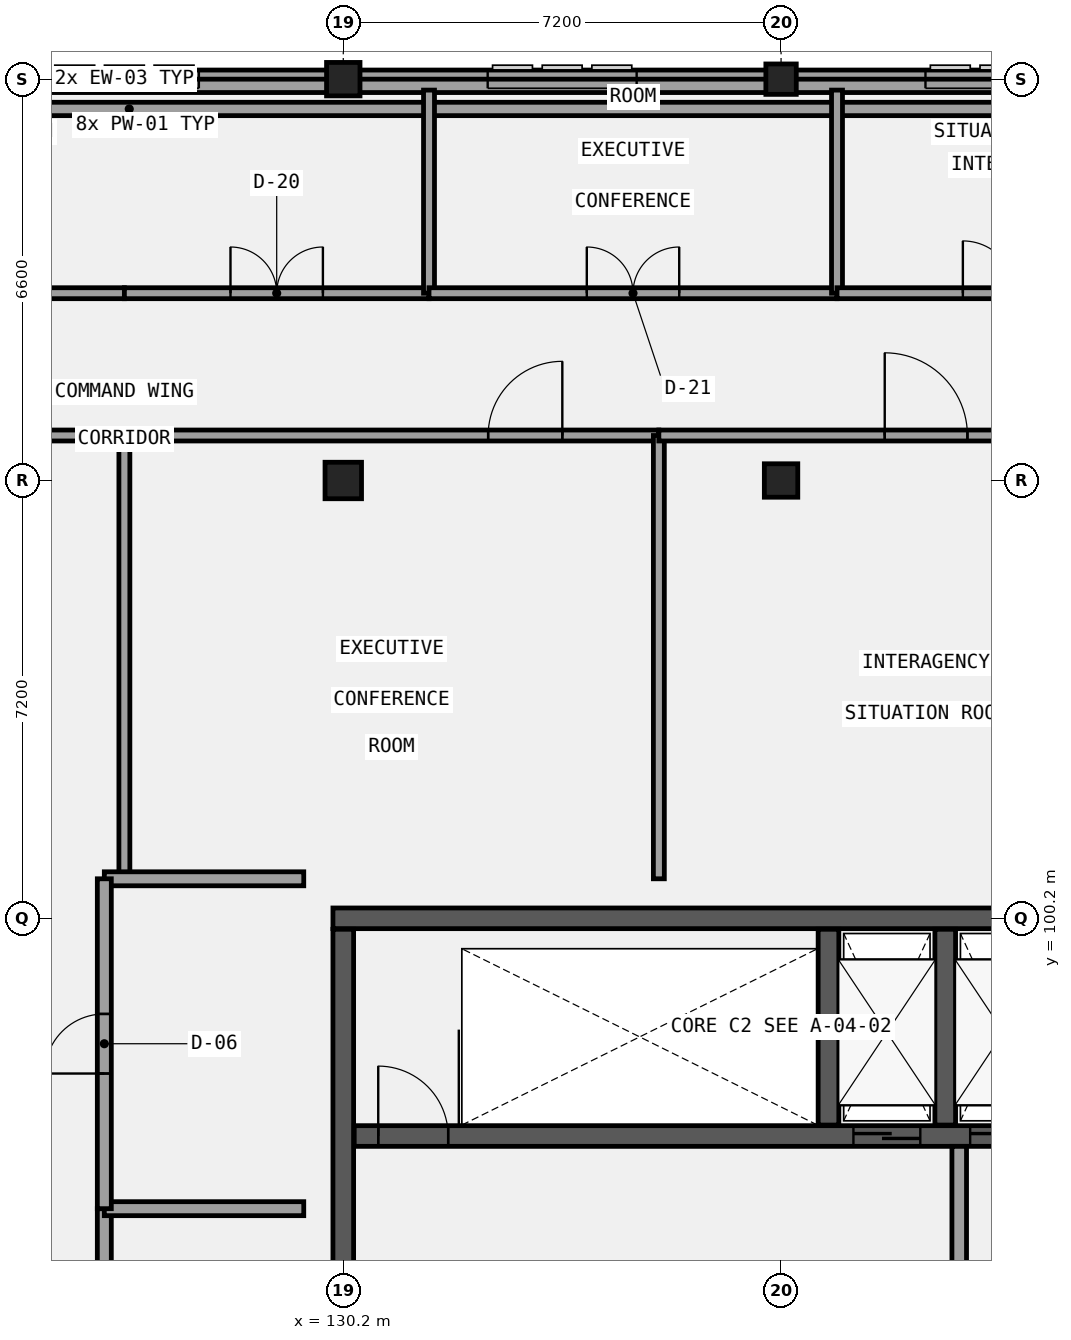
"""IFC4 building model, lengths in metres.
Left out: names, types, materials, properties, quantities, classifications, styles, units other than length and angle.
Written with IfcOpenShell. Run it as: python <this file> out.ifc"""

import sys

from ifc_helpers import new_model, si_unit, direction, frame, frame_2d, origin, origin_2d, place, context, subcontext, project, spatial, rectangle, extrude, element, fill, save


model = new_model("IFC4")
c1 = context("Model", 3, precision=1e-05, world=origin(), true_north=direction((0.0, 1.0)))
c2 = subcontext(c1, "Body", "Model", "MODEL_VIEW")
j1 = project(units=[si_unit("LENGTHUNIT", "METRE"), si_unit("PLANEANGLEUNIT", "RADIAN")], contexts=[c1])
p1 = place(None, origin())
s1 = spatial("IfcSite", under=j1, at=p1, CompositionType="ELEMENT")
p2 = place(p1, origin())
s2 = spatial("IfcBuilding", under=s1, at=p2, CompositionType="ELEMENT")
p3 = place(p2, frame((0.0, 0.0, 30.9)))
s3 = spatial("IfcBuildingStorey", under=s2, at=p3, CompositionType="ELEMENT", Elevation=30.9)
p4 = place(p3, frame((130.03, 100.2, 0.0), z_axis=(0.0, 0.0, 1.0), x_axis=(1.0, 0.0, 0.0)))
e1 = element("IfcWall", 1, at=p4, inside=s3, PredefinedType="SHEAR", context=c2, shape_type="SweptSolid", body=[
    extrude(rectangle(XDim=14.74, YDim=0.34, at=frame_2d((7.37, 0.0))), origin(), (0.0, 0.0, 1.0), 4.5),
])
p5 = place(p3, frame((130.2, 93.18, 0.0), z_axis=(0.0, 0.0, 1.0), x_axis=(0.0, 1.0, 0.0)))
e2 = element("IfcWall", 2, at=p5, inside=s3, PredefinedType="SHEAR", context=c2, shape_type="SweptSolid", body=[
    extrude(rectangle(XDim=6.84, YDim=0.34, at=frame_2d((3.42, 0.0))), origin(), (0.0, 0.0, 1.0), 4.5),
])
p6 = place(p3, frame((130.38, 96.62, 0.0), z_axis=(0.0, 0.0, 1.0), x_axis=(1.0, 0.0, 0.0)))
e3 = element("IfcWall", 3, at=p6, inside=s3, PredefinedType="SHEAR", context=c2, shape_type="SweptSolid", body=[
    extrude(rectangle(XDim=14.04, YDim=0.34, at=frame_2d((7.02, 0.0))), origin(), (0.0, 0.0, 1.0), 4.5),
])
p7 = place(p6, frame((8.21, 0.0, 0.0)))
e4 = element("IfcOpeningElement", 4, at=p7, cuts=e3, PredefinedType="OPENING", context=c2, shape_type="SweptSolid", body=[
    extrude(rectangle(XDim=1.1, YDim=2.15, at=frame_2d((0.55, 1.075))), frame((0.0, 0.18, 0.0), z_axis=(0.0, -1.0, 0.0), x_axis=(1.0, 0.0, 0.0)), (0.0, 0.0, 1.0), 0.36),
])
p8 = place(p6, frame((10.13, 0.0, 0.0)))
e5 = element("IfcOpeningElement", 5, at=p8, cuts=e3, PredefinedType="OPENING", context=c2, shape_type="SweptSolid", body=[
    extrude(rectangle(XDim=1.1, YDim=2.15, at=frame_2d((0.55, 1.075))), frame((0.0, 0.18, 0.0), z_axis=(0.0, -1.0, 0.0), x_axis=(1.0, 0.0, 0.0)), (0.0, 0.0, 1.0), 0.36),
])
p9 = place(p6, frame((12.05, 0.0, 0.0)))
e6 = element("IfcOpeningElement", 6, at=p9, cuts=e3, PredefinedType="OPENING", context=c2, shape_type="SweptSolid", body=[
    extrude(rectangle(XDim=1.1, YDim=2.15, at=frame_2d((0.55, 1.075))), frame((0.0, 0.18, 0.0), z_axis=(0.0, -1.0, 0.0), x_axis=(1.0, 0.0, 0.0)), (0.0, 0.0, 1.0), 0.36),
])
p10 = place(p6, frame((0.395, 0.0, 0.0)))
e7 = element("IfcOpeningElement", 7, at=p10, cuts=e3, PredefinedType="OPENING", context=c2, shape_type="SweptSolid", body=[
    extrude(rectangle(XDim=1.15, YDim=2.15, at=frame_2d((0.575, 1.075))), frame((0.0, 0.18, 0.0), z_axis=(0.0, -1.0, 0.0), x_axis=(1.0, 0.0, 0.0)), (0.0, 0.0, 1.0), 0.36),
])
for number, where, z_axis, x_axis in (
    (8, (138.18, 96.8, 0.0), (0.0, 0.0, 1.0), (0.0, 1.0, 0.0)),
    (9, (140.1, 96.8, 0.0), (0.0, 0.0, 1.0), (0.0, 1.0, 0.0)),
):
    element("IfcWall", number, at=place(p3, frame(where, z_axis=z_axis, x_axis=x_axis)), inside=s3, PredefinedType="SHEAR", context=c2, shape_type="SweptSolid", body=[
        extrude(rectangle(XDim=3.22, YDim=0.34, at=frame_2d((1.61, 0.0))), origin(), (0.0, 0.0, 1.0), 4.5),
    ])
p11 = place(p3, frame((130.2, 107.4, 0.0), z_axis=(0.0, 0.0, 1.0), x_axis=(1.0, 0.0, 0.0)))
e10 = element("IfcColumn", 10, at=p11, inside=s3, PredefinedType="COLUMN", context=c2, shape_type="SweptSolid", body=[
    extrude(rectangle(XDim=0.6, YDim=0.6, at=origin_2d()), origin(), (0.0, 0.0, 1.0), 4.5),
])
for number, where, z_axis, x_axis in (
    (11, (130.2, 114.0, 0.0), (0.0, 0.0, 1.0), (1.0, 0.0, 0.0)),
    (12, (137.4, 107.4, 0.0), (0.0, 0.0, 1.0), (1.0, 0.0, 0.0)),
):
    element("IfcColumn", number, at=place(p3, frame(where, z_axis=z_axis, x_axis=x_axis)), inside=s3, PredefinedType="COLUMN", context=c2, shape_type="SweptSolid", body=[
        extrude(rectangle(XDim=0.55, YDim=0.55, at=origin_2d()), origin(), (0.0, 0.0, 1.0), 4.5),
    ])
p12 = place(p3, frame((137.4, 114.0, 0.0), z_axis=(0.0, 0.0, 1.0), x_axis=(1.0, 0.0, 0.0)))
e13 = element("IfcColumn", 13, at=p12, inside=s3, PredefinedType="COLUMN", context=c2, shape_type="SweptSolid", body=[
    extrude(rectangle(XDim=0.5, YDim=0.5, at=origin_2d()), origin(), (0.0, 0.0, 1.0), 4.5),
])
p13 = place(p3, frame((140.33, 93.17, 0.0), z_axis=(0.0, 0.0, 1.0), x_axis=(0.0, 1.0, 0.0)))
e14 = element("IfcWall", 14, at=p13, inside=s3, PredefinedType="SOLIDWALL", context=c2, shape_type="SweptSolid", body=[
    extrude(rectangle(XDim=3.28, YDim=0.24, at=frame_2d((1.64, 0.0))), origin(), (0.0, 0.0, 1.0), 4.22),
])
p14 = place(p3, frame((144.75, 114.0, 0.0), z_axis=(0.0, 0.0, 1.0), x_axis=(-1.0, 0.0, 0.0)))
e15 = element("IfcWall", 15, at=p14, inside=s3, PredefinedType="SOLIDWALL", context=c2, shape_type="SweptSolid", body=[
    extrude(rectangle(XDim=36.3, YDim=0.3, at=frame_2d((18.15, 0.0))), origin(), (0.0, 0.0, 1.0), 3.5),
])
p15 = place(p14, frame((31.45, 0.0, 0.95)))
e16 = element("IfcOpeningElement", 16, at=p15, cuts=e15, PredefinedType="OPENING", context=c2, shape_type="SweptSolid", body=[
    extrude(rectangle(XDim=2.2, YDim=2.15, at=frame_2d((1.1, 1.075))), frame((0.0, 0.16, 0.0), z_axis=(0.0, -1.0, 0.0), x_axis=(1.0, 0.0, 0.0)), (0.0, 0.0, 1.0), 0.32),
])
p16 = place(p14, frame((24.125, 0.0, 0.95)))
e17 = element("IfcOpeningElement", 17, at=p16, cuts=e15, PredefinedType="OPENING", context=c2, shape_type="SweptSolid", body=[
    extrude(rectangle(XDim=2.45, YDim=1.4, at=frame_2d((1.225, 0.7))), frame((0.0, 0.16, 0.0), z_axis=(0.0, -1.0, 0.0), x_axis=(1.0, 0.0, 0.0)), (0.0, 0.0, 1.0), 0.32),
])
p17 = place(p14, frame((16.925, 0.0, 0.95)))
e18 = element("IfcOpeningElement", 18, at=p17, cuts=e15, PredefinedType="OPENING", context=c2, shape_type="SweptSolid", body=[
    extrude(rectangle(XDim=2.45, YDim=1.65, at=frame_2d((1.225, 0.825))), frame((0.0, 0.16, 0.0), z_axis=(0.0, -1.0, 0.0), x_axis=(1.0, 0.0, 0.0)), (0.0, 0.0, 1.0), 0.32),
])
p18 = place(p14, frame((9.725, 0.0, 0.95)))
e19 = element("IfcOpeningElement", 19, at=p18, cuts=e15, PredefinedType="OPENING", context=c2, shape_type="SweptSolid", body=[
    extrude(rectangle(XDim=2.45, YDim=1.9, at=frame_2d((1.225, 0.95))), frame((0.0, 0.16, 0.0), z_axis=(0.0, -1.0, 0.0), x_axis=(1.0, 0.0, 0.0)), (0.0, 0.0, 1.0), 0.32),
])
p19 = place(p14, frame((2.525, 0.0, 0.95)))
e20 = element("IfcOpeningElement", 20, at=p19, cuts=e15, PredefinedType="OPENING", context=c2, shape_type="SweptSolid", body=[
    extrude(rectangle(XDim=2.45, YDim=2.15, at=frame_2d((1.225, 1.075))), frame((0.0, 0.16, 0.0), z_axis=(0.0, -1.0, 0.0), x_axis=(1.0, 0.0, 0.0)), (0.0, 0.0, 1.0), 0.32),
])
p20 = place(p3, frame((144.65, 113.51, 4.5), z_axis=(0.0, 0.0, 1.0), x_axis=(-1.0, 0.0, 0.0)))
e21 = element("IfcWall", 21, at=p20, inside=s3, PredefinedType="PARAPET", context=c2, shape_type="SweptSolid", body=[
    extrude(rectangle(XDim=35.94, YDim=0.22, at=frame_2d((17.97, 0.0))), origin(), (0.0, 0.0, 1.0), 1.12),
])
p21 = place(p3, frame((108.71, 113.89, 4.5), z_axis=(0.0, 0.0, 1.0), x_axis=(1.0, 0.0, 0.0)))
e22 = element("IfcWall", 22, at=p21, inside=s3, PredefinedType="PARAPET", context=c2, shape_type="SweptSolid", body=[
    extrude(rectangle(XDim=35.89, YDim=0.22, at=frame_2d((17.945, 0.0))), origin(), (0.0, 0.0, 1.0), 1.12),
])
p22 = place(p3, frame((117.81, 108.14, 0.0), z_axis=(0.0, 0.0, 1.0), x_axis=(1.0, 0.0, 0.0)))
e23 = element("IfcWall", 23, at=p22, inside=s3, PredefinedType="PARTITIONING", context=c2, shape_type="SweptSolid", body=[
    extrude(rectangle(XDim=8.79, YDim=0.18, at=frame_2d((4.395, 0.0))), origin(), (0.0, 0.0, 1.0), 4.25),
])
p23 = place(p22, frame((1.587, 0.0, 0.0)))
e24 = element("IfcOpeningElement", 24, at=p23, cuts=e23, PredefinedType="OPENING", context=c2, shape_type="SweptSolid", body=[
    extrude(rectangle(XDim=1.22, YDim=2.22, at=frame_2d((0.61, 1.11))), frame((0.0, 0.1, 0.0), z_axis=(0.0, -1.0, 0.0), x_axis=(1.0, 0.0, 0.0)), (0.0, 0.0, 1.0), 0.2),
])
p24 = place(p3, frame((126.6, 100.85, 0.0), z_axis=(0.0, 0.0, 1.0), x_axis=(0.0, 1.0, 0.0)))
e25 = element("IfcWall", 25, at=p24, inside=s3, PredefinedType="PARTITIONING", context=c2, shape_type="SweptSolid", body=[
    extrude(rectangle(XDim=7.29, YDim=0.18, at=frame_2d((3.645, 0.0))), origin(), (0.0, 0.0, 1.0), 4.25),
])
p25 = place(p3, frame((126.6, 108.14, 0.0), z_axis=(0.0, 0.0, 1.0), x_axis=(1.0, 0.0, 0.0)))
e26 = element("IfcWall", 26, at=p25, inside=s3, PredefinedType="PARTITIONING", context=c2, shape_type="SweptSolid", body=[
    extrude(rectangle(XDim=8.79, YDim=0.18, at=frame_2d((4.395, 0.0))), origin(), (0.0, 0.0, 1.0), 4.25),
])
p26 = place(p25, frame((5.982, 0.0, 0.0)))
e27 = element("IfcOpeningElement", 27, at=p26, cuts=e26, PredefinedType="OPENING", context=c2, shape_type="SweptSolid", body=[
    extrude(rectangle(XDim=1.22, YDim=2.35, at=frame_2d((0.61, 1.175))), frame((0.0, 0.1, 0.0), z_axis=(0.0, -1.0, 0.0), x_axis=(1.0, 0.0, 0.0)), (0.0, 0.0, 1.0), 0.2),
])
p27 = place(p3, frame((135.39, 100.85, 0.0), z_axis=(0.0, 0.0, 1.0), x_axis=(0.0, 1.0, 0.0)))
e28 = element("IfcWall", 28, at=p27, inside=s3, PredefinedType="PARTITIONING", context=c2, shape_type="SweptSolid", body=[
    extrude(rectangle(XDim=7.29, YDim=0.18, at=frame_2d((3.645, 0.0))), origin(), (0.0, 0.0, 1.0), 4.25),
])
p28 = place(p3, frame((135.39, 108.14, 0.0), z_axis=(0.0, 0.0, 1.0), x_axis=(1.0, 0.0, 0.0)))
e29 = element("IfcWall", 29, at=p28, inside=s3, PredefinedType="PARTITIONING", context=c2, shape_type="SweptSolid", body=[
    extrude(rectangle(XDim=8.79, YDim=0.18, at=frame_2d((4.395, 0.0))), origin(), (0.0, 0.0, 1.0), 4.25),
])
p29 = place(p28, frame((3.715, 0.0, 0.0)))
e30 = element("IfcOpeningElement", 30, at=p29, cuts=e29, PredefinedType="OPENING", context=c2, shape_type="SweptSolid", body=[
    extrude(rectangle(XDim=1.36, YDim=2.1, at=frame_2d((0.68, 1.05))), frame((0.0, 0.1, 0.0), z_axis=(0.0, -1.0, 0.0), x_axis=(1.0, 0.0, 0.0)), (0.0, 0.0, 1.0), 0.2),
])
p30 = place(p3, frame((121.59, 110.48, 0.0), z_axis=(0.0, 0.0, 1.0), x_axis=(1.0, 0.0, 0.0)))
e31 = element("IfcWall", 31, at=p30, inside=s3, PredefinedType="PARTITIONING", context=c2, shape_type="SweptSolid", body=[
    extrude(rectangle(XDim=5.01, YDim=0.18, at=frame_2d((2.505, 0.0))), origin(), (0.0, 0.0, 1.0), 3.7),
])
p31 = place(p30, frame((1.745, 0.0, 0.0)))
e32 = element("IfcOpeningElement", 32, at=p31, cuts=e31, PredefinedType="OPENING", context=c2, shape_type="SweptSolid", body=[
    extrude(rectangle(XDim=1.52, YDim=2.1, at=frame_2d((0.76, 1.05))), frame((0.0, 0.1, 0.0), z_axis=(0.0, -1.0, 0.0), x_axis=(1.0, 0.0, 0.0)), (0.0, 0.0, 1.0), 0.2),
])
p32 = place(p3, frame((126.6, 110.48, 0.0), z_axis=(0.0, 0.0, 1.0), x_axis=(1.0, 0.0, 0.0)))
e33 = element("IfcWall", 33, at=p32, inside=s3, PredefinedType="PARTITIONING", context=c2, shape_type="SweptSolid", body=[
    extrude(rectangle(XDim=5.01, YDim=0.18, at=frame_2d((2.505, 0.0))), origin(), (0.0, 0.0, 1.0), 3.7),
])
p33 = place(p32, frame((1.745, 0.0, 0.0)))
e34 = element("IfcOpeningElement", 34, at=p33, cuts=e33, PredefinedType="OPENING", context=c2, shape_type="SweptSolid", body=[
    extrude(rectangle(XDim=1.52, YDim=2.22, at=frame_2d((0.76, 1.11))), frame((0.0, 0.1, 0.0), z_axis=(0.0, -1.0, 0.0), x_axis=(1.0, 0.0, 0.0)), (0.0, 0.0, 1.0), 0.2),
])
p34 = place(p3, frame((131.61, 110.48, 0.0), z_axis=(0.0, 0.0, 1.0), x_axis=(0.0, 1.0, 0.0)))
e35 = element("IfcWall", 35, at=p34, inside=s3, PredefinedType="PARTITIONING", context=c2, shape_type="SweptSolid", body=[
    extrude(rectangle(XDim=3.34, YDim=0.18, at=frame_2d((1.67, 0.0))), origin(), (0.0, 0.0, 1.0), 4.25),
])
p35 = place(p3, frame((131.61, 110.48, 0.0), z_axis=(0.0, 0.0, 1.0), x_axis=(1.0, 0.0, 0.0)))
e36 = element("IfcWall", 36, at=p35, inside=s3, PredefinedType="PARTITIONING", context=c2, shape_type="SweptSolid", body=[
    extrude(rectangle(XDim=6.71, YDim=0.18, at=frame_2d((3.355, 0.0))), origin(), (0.0, 0.0, 1.0), 3.7),
])
p36 = place(p35, frame((2.595, 0.0, 0.0)))
e37 = element("IfcOpeningElement", 37, at=p36, cuts=e36, PredefinedType="OPENING", context=c2, shape_type="SweptSolid", body=[
    extrude(rectangle(XDim=1.52, YDim=2.35, at=frame_2d((0.76, 1.175))), frame((0.0, 0.1, 0.0), z_axis=(0.0, -1.0, 0.0), x_axis=(1.0, 0.0, 0.0)), (0.0, 0.0, 1.0), 0.2),
])
p37 = place(p3, frame((138.32, 110.48, 0.0), z_axis=(0.0, 0.0, 1.0), x_axis=(0.0, 1.0, 0.0)))
e38 = element("IfcWall", 38, at=p37, inside=s3, PredefinedType="PARTITIONING", context=c2, shape_type="SweptSolid", body=[
    extrude(rectangle(XDim=3.34, YDim=0.18, at=frame_2d((1.67, 0.0))), origin(), (0.0, 0.0, 1.0), 4.25),
])
p38 = place(p3, frame((138.32, 110.48, 0.0), z_axis=(0.0, 0.0, 1.0), x_axis=(1.0, 0.0, 0.0)))
e39 = element("IfcWall", 39, at=p38, inside=s3, PredefinedType="PARTITIONING", context=c2, shape_type="SweptSolid", body=[
    extrude(rectangle(XDim=5.86, YDim=0.18, at=frame_2d((2.93, 0.0))), origin(), (0.0, 0.0, 1.0), 3.7),
])
p39 = place(p38, frame((2.07, 0.0, 0.0)))
e40 = element("IfcOpeningElement", 40, at=p39, cuts=e39, PredefinedType="OPENING", context=c2, shape_type="SweptSolid", body=[
    extrude(rectangle(XDim=1.72, YDim=2.1, at=frame_2d((0.86, 1.05))), frame((0.0, 0.1, 0.0), z_axis=(0.0, -1.0, 0.0), x_axis=(1.0, 0.0, 0.0)), (0.0, 0.0, 1.0), 0.2),
])
p40 = place(p3, frame((126.27, 100.85, 0.0), z_axis=(0.0, 0.0, 1.0), x_axis=(1.0, 0.0, 0.0)))
e41 = element("IfcWall", 41, at=p40, inside=s3, PredefinedType="PARTITIONING", context=c2, shape_type="SweptSolid", body=[
    extrude(rectangle(XDim=3.28, YDim=0.23, at=frame_2d((1.64, 0.0))), origin(), (0.0, 0.0, 1.0), 4.25),
])
p41 = place(p3, frame((126.27, 90.0, 0.0), z_axis=(0.0, 0.0, 1.0), x_axis=(0.0, 1.0, 0.0)))
e42 = element("IfcWall", 42, at=p41, inside=s3, PredefinedType="PARTITIONING", context=c2, shape_type="SweptSolid", body=[
    extrude(rectangle(XDim=5.425, YDim=0.23, at=frame_2d((2.712, 0.0))), origin(), (0.0, 0.0, 1.0), 4.25),
])
p42 = place(p41, frame((2.222, 0.0, 0.0)))
e43 = element("IfcOpeningElement", 43, at=p42, cuts=e42, PredefinedType="OPENING", context=c2, shape_type="SweptSolid", body=[
    extrude(rectangle(XDim=0.98, YDim=2.22, at=frame_2d((0.49, 1.11))), frame((0.0, 0.125, 0.0), z_axis=(0.0, -1.0, 0.0), x_axis=(1.0, 0.0, 0.0)), (0.0, 0.0, 1.0), 0.25),
])
p43 = place(p3, frame((126.27, 95.425, 0.0), z_axis=(0.0, 0.0, 1.0), x_axis=(1.0, 0.0, 0.0)))
e44 = element("IfcWall", 44, at=p43, inside=s3, PredefinedType="PARTITIONING", context=c2, shape_type="SweptSolid", body=[
    extrude(rectangle(XDim=3.28, YDim=0.23, at=frame_2d((1.64, 0.0))), origin(), (0.0, 0.0, 1.0), 4.25),
])
p44 = place(p3, frame((126.27, 95.425, 0.0), z_axis=(0.0, 0.0, 1.0), x_axis=(0.0, 1.0, 0.0)))
e45 = element("IfcWall", 45, at=p44, inside=s3, PredefinedType="PARTITIONING", context=c2, shape_type="SweptSolid", body=[
    extrude(rectangle(XDim=5.425, YDim=0.23, at=frame_2d((2.712, 0.0))), origin(), (0.0, 0.0, 1.0), 4.25),
])
p45 = place(p44, frame((2.222, 0.0, 0.0)))
e46 = element("IfcOpeningElement", 46, at=p45, cuts=e45, PredefinedType="OPENING", context=c2, shape_type="SweptSolid", body=[
    extrude(rectangle(XDim=0.98, YDim=2.35, at=frame_2d((0.49, 1.175))), frame((0.0, 0.125, 0.0), z_axis=(0.0, -1.0, 0.0), x_axis=(1.0, 0.0, 0.0)), (0.0, 0.0, 1.0), 0.25),
])
p46 = place(p7, frame((1.1, 0.0, 0.0), z_axis=(0.0, 0.0, 1.0), x_axis=(-1.0, 0.0, 0.0)))
e47 = element("IfcDoor", 47, at=p46, inside=s3, OperationType="DOUBLE_DOOR_SLIDING", PredefinedType="DOOR", context=c2, shape_type="SweptSolid", body=[
    extrude(rectangle(XDim=1.1, YDim=2.15, at=frame_2d((0.55, 1.075))), frame((0.0, 0.025, 0.0), z_axis=(0.0, -1.0, 0.0), x_axis=(1.0, 0.0, 0.0)), (0.0, 0.0, 1.0), 0.05),
])
fill(e4, e47)
p47 = place(p8, frame((1.1, 0.0, 0.0), z_axis=(0.0, 0.0, 1.0), x_axis=(-1.0, 0.0, 0.0)))
e48 = element("IfcDoor", 48, at=p47, inside=s3, OperationType="DOUBLE_DOOR_SLIDING", PredefinedType="DOOR", context=c2, shape_type="SweptSolid", body=[
    extrude(rectangle(XDim=1.1, YDim=2.15, at=frame_2d((0.55, 1.075))), frame((0.0, 0.025, 0.0), z_axis=(0.0, -1.0, 0.0), x_axis=(1.0, 0.0, 0.0)), (0.0, 0.0, 1.0), 0.05),
])
fill(e5, e48)
p48 = place(p10, origin())
e49 = element("IfcDoor", 49, at=p48, inside=s3, OperationType="SINGLE_SWING_LEFT", PredefinedType="DOOR", context=c2, shape_type="SweptSolid", body=[
    extrude(rectangle(XDim=1.15, YDim=2.15, at=frame_2d((0.575, 1.075))), frame((0.0, 0.025, 0.0), z_axis=(0.0, -1.0, 0.0), x_axis=(1.0, 0.0, 0.0)), (0.0, 0.0, 1.0), 0.05),
])
fill(e7, e49)
p49 = place(p17, origin())
e50 = element("IfcWindow", 50, at=p49, inside=s3, PartitioningType="SINGLE_PANEL", PredefinedType="WINDOW", context=c2, shape_type="SweptSolid", body=[
    extrude(rectangle(XDim=2.45, YDim=1.65, at=frame_2d((1.225, 0.825))), frame((0.0, 0.03, 0.0), z_axis=(0.0, -1.0, 0.0), x_axis=(1.0, 0.0, 0.0)), (0.0, 0.0, 1.0), 0.06),
])
fill(e18, e50)
p50 = place(p18, origin())
e51 = element("IfcWindow", 51, at=p50, inside=s3, PartitioningType="SINGLE_PANEL", PredefinedType="WINDOW", context=c2, shape_type="SweptSolid", body=[
    extrude(rectangle(XDim=2.45, YDim=1.9, at=frame_2d((1.225, 0.95))), frame((0.0, 0.03, 0.0), z_axis=(0.0, -1.0, 0.0), x_axis=(1.0, 0.0, 0.0)), (0.0, 0.0, 1.0), 0.06),
])
fill(e19, e51)
p51 = place(p19, origin())
e52 = element("IfcWindow", 52, at=p51, inside=s3, PartitioningType="SINGLE_PANEL", PredefinedType="WINDOW", context=c2, shape_type="SweptSolid", body=[
    extrude(rectangle(XDim=2.45, YDim=2.15, at=frame_2d((1.225, 1.075))), frame((0.0, 0.03, 0.0), z_axis=(0.0, -1.0, 0.0), x_axis=(1.0, 0.0, 0.0)), (0.0, 0.0, 1.0), 0.06),
])
fill(e20, e52)
p52 = place(p26, frame((1.22, 0.0, 0.0), z_axis=(0.0, 0.0, 1.0), x_axis=(-1.0, 0.0, 0.0)))
e53 = element("IfcDoor", 53, at=p52, inside=s3, OperationType="SINGLE_SWING_RIGHT", PredefinedType="DOOR", context=c2, shape_type="SweptSolid", body=[
    extrude(rectangle(XDim=1.22, YDim=2.35, at=frame_2d((0.61, 1.175))), frame((0.0, 0.025, 0.0), z_axis=(0.0, -1.0, 0.0), x_axis=(1.0, 0.0, 0.0)), (0.0, 0.0, 1.0), 0.05),
])
fill(e27, e53)
p53 = place(p29, frame((1.36, 0.0, 0.0), z_axis=(0.0, 0.0, 1.0), x_axis=(-1.0, 0.0, 0.0)))
e54 = element("IfcDoor", 54, at=p53, inside=s3, OperationType="SINGLE_SWING_LEFT", PredefinedType="DOOR", context=c2, shape_type="SweptSolid", body=[
    extrude(rectangle(XDim=1.36, YDim=2.1, at=frame_2d((0.68, 1.05))), frame((0.0, 0.025, 0.0), z_axis=(0.0, -1.0, 0.0), x_axis=(1.0, 0.0, 0.0)), (0.0, 0.0, 1.0), 0.05),
])
fill(e30, e54)
p54 = place(p33, origin())
e55 = element("IfcDoor", 55, at=p54, inside=s3, OperationType="DOUBLE_DOOR_SINGLE_SWING", PredefinedType="DOOR", context=c2, shape_type="SweptSolid", body=[
    extrude(rectangle(XDim=1.52, YDim=2.22, at=frame_2d((0.76, 1.11))), frame((0.0, 0.025, 0.0), z_axis=(0.0, -1.0, 0.0), x_axis=(1.0, 0.0, 0.0)), (0.0, 0.0, 1.0), 0.05),
])
fill(e34, e55)
p55 = place(p36, origin())
e56 = element("IfcDoor", 56, at=p55, inside=s3, OperationType="DOUBLE_DOOR_SINGLE_SWING", PredefinedType="DOOR", context=c2, shape_type="SweptSolid", body=[
    extrude(rectangle(XDim=1.52, YDim=2.35, at=frame_2d((0.76, 1.175))), frame((0.0, 0.025, 0.0), z_axis=(0.0, -1.0, 0.0), x_axis=(1.0, 0.0, 0.0)), (0.0, 0.0, 1.0), 0.05),
])
fill(e37, e56)
p56 = place(p39, origin())
e57 = element("IfcDoor", 57, at=p56, inside=s3, OperationType="DOUBLE_DOOR_SINGLE_SWING", PredefinedType="DOOR", context=c2, shape_type="SweptSolid", body=[
    extrude(rectangle(XDim=1.72, YDim=2.1, at=frame_2d((0.86, 1.05))), frame((0.0, 0.025, 0.0), z_axis=(0.0, -1.0, 0.0), x_axis=(1.0, 0.0, 0.0)), (0.0, 0.0, 1.0), 0.05),
])
fill(e40, e57)
p57 = place(p45, origin())
e58 = element("IfcDoor", 58, at=p57, inside=s3, OperationType="SINGLE_SWING_LEFT", PredefinedType="DOOR", context=c2, shape_type="SweptSolid", body=[
    extrude(rectangle(XDim=0.98, YDim=2.35, at=frame_2d((0.49, 1.175))), frame((0.0, 0.025, 0.0), z_axis=(0.0, -1.0, 0.0), x_axis=(1.0, 0.0, 0.0)), (0.0, 0.0, 1.0), 0.05),
])
fill(e46, e58)
save(model, sys.argv[1])
